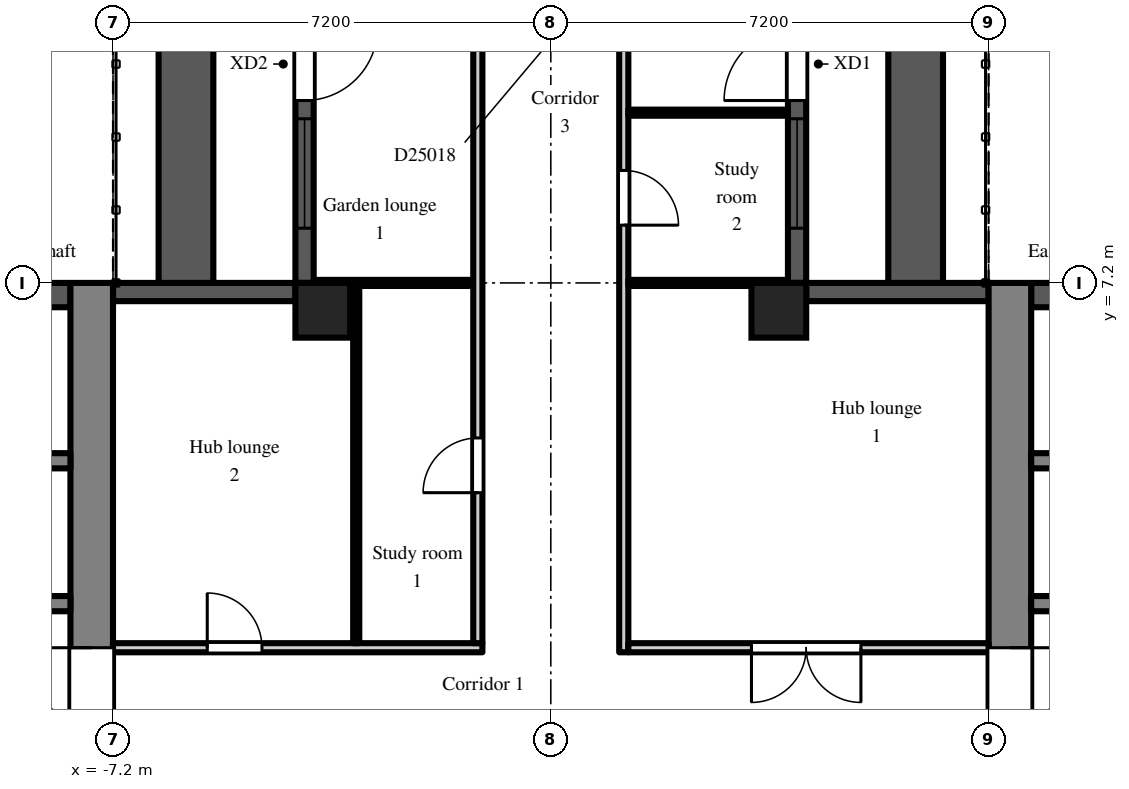
"""IFC4 building model, lengths in metres.
Left out: names, types, materials, properties, quantities, classifications, styles, units other than length and angle.
Written with IfcOpenShell. Run it as: python <this file> out.ifc"""

import sys

from ifc_helpers import new_model, si_unit, direction, frame, frame_2d, origin, origin_2d, place, context, subcontext, project, spatial, rectangle, extrude, element, fill, save


model = new_model("IFC4")
c1 = context("Model", 3, precision=1e-05, world=origin(), true_north=direction((0.0, 1.0)))
c2 = subcontext(c1, "Body", "Model", "MODEL_VIEW")
j1 = project(units=[si_unit("LENGTHUNIT", "METRE"), si_unit("PLANEANGLEUNIT", "RADIAN")], contexts=[c1])
p1 = place(None, origin())
s1 = spatial("IfcSite", under=j1, at=p1, CompositionType="ELEMENT")
p2 = place(p1, origin())
s2 = spatial("IfcBuilding", under=s1, at=p2, CompositionType="ELEMENT")
p3 = place(p2, frame((0.0, 0.0, 170.7)))
s3 = spatial("IfcBuildingStorey", under=s2, at=p3, CompositionType="ELEMENT", Elevation=170.7)
for number, where, z_axis, x_axis in (
    (1, (-3.75, 6.75, 0.0), (0.0, 0.0, 1.0), (1.0, 0.0, 0.0)),
    (2, (3.75, 6.75, 0.0), (0.0, 0.0, 1.0), (1.0, 0.0, 0.0)),
):
    element("IfcColumn", number, at=place(p3, frame(where, z_axis=z_axis, x_axis=x_axis)), inside=s3, PredefinedType="COLUMN", context=c2, shape_type="SweptSolid", body=[
        extrude(rectangle(XDim=0.9, YDim=0.9, at=origin_2d()), origin(), (0.0, 0.0, 1.0), 3.0),
    ])
p4 = place(p3, frame((7.2, 7.05, 0.0), z_axis=(0.0, 0.0, 1.0), x_axis=(-1.0, 0.0, 0.0)))
e3 = element("IfcWall", 3, at=p4, inside=s3, PredefinedType="SOLIDWALL", context=c2, shape_type="SweptSolid", body=[
    extrude(rectangle(XDim=3.0, YDim=0.3, at=frame_2d((1.5, 0.0))), origin(), (0.0, 0.0, 1.0), 2.2),
])
p5 = place(p3, frame((4.05, 7.2, 0.0), z_axis=(0.0, 0.0, 1.0), x_axis=(0.0, 1.0, 0.0)))
e4 = element("IfcWall", 4, at=p5, inside=s3, PredefinedType="SOLIDWALL", context=c2, shape_type="SweptSolid", body=[
    extrude(rectangle(XDim=7.2, YDim=0.3, at=frame_2d((3.6, 0.0))), origin(), (0.0, 0.0, 1.0), 2.2),
])
p6 = place(p5, frame((3.0, 0.0, 0.0)))
e5 = element("IfcOpeningElement", 5, at=p6, cuts=e4, PredefinedType="OPENING", context=c2, shape_type="SweptSolid", body=[
    extrude(rectangle(XDim=1.2, YDim=2.05, at=frame_2d((0.6, 1.025))), frame((0.0, 0.16, 0.0), z_axis=(0.0, -1.0, 0.0), x_axis=(1.0, 0.0, 0.0)), (0.0, 0.0, 1.0), 0.32),
])
p7 = place(p5, frame((0.9, 0.0, 0.2)))
e6 = element("IfcOpeningElement", 6, at=p7, cuts=e4, PredefinedType="OPENING", context=c2, shape_type="SweptSolid", body=[
    extrude(rectangle(XDim=1.8, YDim=1.85, at=frame_2d((0.9, 0.925))), frame((0.0, 0.16, 0.0), z_axis=(0.0, -1.0, 0.0), x_axis=(1.0, 0.0, 0.0)), (0.0, 0.0, 1.0), 0.32),
])
p8 = place(p5, frame((4.5, 0.0, 0.2)))
e7 = element("IfcOpeningElement", 7, at=p8, cuts=e4, PredefinedType="OPENING", context=c2, shape_type="SweptSolid", body=[
    extrude(rectangle(XDim=1.8, YDim=1.85, at=frame_2d((0.9, 0.925))), frame((0.0, 0.16, 0.0), z_axis=(0.0, -1.0, 0.0), x_axis=(1.0, 0.0, 0.0)), (0.0, 0.0, 1.0), 0.32),
])
p9 = place(p3, frame((-4.05, 14.4, 0.0), z_axis=(0.0, 0.0, 1.0), x_axis=(0.0, -1.0, 0.0)))
e8 = element("IfcWall", 8, at=p9, inside=s3, PredefinedType="SOLIDWALL", context=c2, shape_type="SweptSolid", body=[
    extrude(rectangle(XDim=7.2, YDim=0.3, at=frame_2d((3.6, 0.0))), origin(), (0.0, 0.0, 1.0), 2.2),
])
p10 = place(p9, frame((3.0, 0.0, 0.0)))
e9 = element("IfcOpeningElement", 9, at=p10, cuts=e8, PredefinedType="OPENING", context=c2, shape_type="SweptSolid", body=[
    extrude(rectangle(XDim=1.2, YDim=2.05, at=frame_2d((0.6, 1.025))), frame((0.0, 0.16, 0.0), z_axis=(0.0, -1.0, 0.0), x_axis=(1.0, 0.0, 0.0)), (0.0, 0.0, 1.0), 0.32),
])
p11 = place(p9, frame((0.9, 0.0, 0.2)))
e10 = element("IfcOpeningElement", 10, at=p11, cuts=e8, PredefinedType="OPENING", context=c2, shape_type="SweptSolid", body=[
    extrude(rectangle(XDim=1.8, YDim=1.85, at=frame_2d((0.9, 0.925))), frame((0.0, 0.16, 0.0), z_axis=(0.0, -1.0, 0.0), x_axis=(1.0, 0.0, 0.0)), (0.0, 0.0, 1.0), 0.32),
])
p12 = place(p9, frame((4.5, 0.0, 0.2)))
e11 = element("IfcOpeningElement", 11, at=p12, cuts=e8, PredefinedType="OPENING", context=c2, shape_type="SweptSolid", body=[
    extrude(rectangle(XDim=1.8, YDim=1.85, at=frame_2d((0.9, 0.925))), frame((0.0, 0.16, 0.0), z_axis=(0.0, -1.0, 0.0), x_axis=(1.0, 0.0, 0.0)), (0.0, 0.0, 1.0), 0.32),
])
p13 = place(p3, frame((-4.2, 7.05, 0.0), z_axis=(0.0, 0.0, 1.0), x_axis=(-1.0, 0.0, 0.0)))
e12 = element("IfcWall", 12, at=p13, inside=s3, PredefinedType="SOLIDWALL", context=c2, shape_type="SweptSolid", body=[
    extrude(rectangle(XDim=3.0, YDim=0.3, at=frame_2d((1.5, 0.0))), origin(), (0.0, 0.0, 1.0), 2.2),
])
for number, where, z_axis, x_axis in (
    (13, (6.0, 7.2, 0.0), (0.0, 0.0, 1.0), (0.0, 1.0, 0.0)),
    (14, (-6.0, 7.2, 0.0), (0.0, 0.0, 1.0), (0.0, 1.0, 0.0)),
):
    element("IfcWall", number, at=place(p3, frame(where, z_axis=z_axis, x_axis=x_axis)), inside=s3, PredefinedType="PARAPET", context=c2, shape_type="SweptSolid", body=[
        extrude(rectangle(XDim=7.2, YDim=0.9, at=frame_2d((3.6, 0.0))), origin(), (0.0, 0.0, 1.0), 0.8),
    ])
p14 = place(p3, frame((7.55, -7.2, 0.0), z_axis=(0.0, 0.0, 1.0), x_axis=(0.0, 1.0, 0.0)))
e15 = element("IfcWall", 15, at=p14, inside=s3, PredefinedType="SHEAR", context=c2, shape_type="SweptSolid", body=[
    extrude(rectangle(XDim=14.4, YDim=0.7, at=frame_2d((7.2, 0.0))), origin(), (0.0, 0.0, 1.0), 2.6),
])
p15 = place(p14, frame((6.0, 0.0, 0.0)))
e16 = element("IfcOpeningElement", 16, at=p15, cuts=e15, PredefinedType="OPENING", context=c2, shape_type="SweptSolid", body=[
    extrude(rectangle(XDim=2.4, YDim=2.2, at=frame_2d((1.2, 1.1))), frame((0.0, 0.36, 0.0), z_axis=(0.0, -1.0, 0.0), x_axis=(1.0, 0.0, 0.0)), (0.0, 0.0, 1.0), 0.72),
])
p16 = place(p3, frame((7.9, 7.0, 0.0), z_axis=(0.0, 0.0, 1.0), x_axis=(1.0, 0.0, 0.0)))
e17 = element("IfcWall", 17, at=p16, inside=s3, PredefinedType="SHEAR", context=c2, shape_type="SweptSolid", body=[
    extrude(rectangle(XDim=12.95, YDim=0.4, at=frame_2d((6.475, 0.0))), origin(), (0.0, 0.0, 1.0), 2.6),
])
p17 = place(p3, frame((7.9, 1.925, 0.0), z_axis=(0.0, 0.0, 1.0), x_axis=(1.0, 0.0, 0.0)))
e18 = element("IfcWall", 18, at=p17, inside=s3, PredefinedType="SHEAR", context=c2, shape_type="SweptSolid", body=[
    extrude(rectangle(XDim=12.95, YDim=0.25, at=frame_2d((6.475, 0.0))), origin(), (0.0, 0.0, 1.0), 2.6),
])
p18 = place(p17, frame((4.825, 0.0, 0.0)))
e19 = element("IfcOpeningElement", 19, at=p18, cuts=e18, PredefinedType="OPENING", context=c2, shape_type="SweptSolid", body=[
    extrude(rectangle(XDim=1.1, YDim=2.1, at=frame_2d((0.55, 1.05))), frame((0.0, 0.135, 0.0), z_axis=(0.0, -1.0, 0.0), x_axis=(1.0, 0.0, 0.0)), (0.0, 0.0, 1.0), 0.27),
])
p19 = place(p17, frame((7.025, 0.0, 0.0)))
e20 = element("IfcOpeningElement", 20, at=p19, cuts=e18, PredefinedType="OPENING", context=c2, shape_type="SweptSolid", body=[
    extrude(rectangle(XDim=1.1, YDim=2.1, at=frame_2d((0.55, 1.05))), frame((0.0, 0.135, 0.0), z_axis=(0.0, -1.0, 0.0), x_axis=(1.0, 0.0, 0.0)), (0.0, 0.0, 1.0), 0.27),
])
p20 = place(p17, frame((9.225, 0.0, 0.0)))
e21 = element("IfcOpeningElement", 21, at=p20, cuts=e18, PredefinedType="OPENING", context=c2, shape_type="SweptSolid", body=[
    extrude(rectangle(XDim=1.1, YDim=2.1, at=frame_2d((0.55, 1.05))), frame((0.0, 0.135, 0.0), z_axis=(0.0, -1.0, 0.0), x_axis=(1.0, 0.0, 0.0)), (0.0, 0.0, 1.0), 0.27),
])
p21 = place(p17, frame((0.525, 0.0, 0.0)))
e22 = element("IfcOpeningElement", 22, at=p21, cuts=e18, PredefinedType="OPENING", context=c2, shape_type="SweptSolid", body=[
    extrude(rectangle(XDim=0.9, YDim=2.1, at=frame_2d((0.45, 1.05))), frame((0.0, 0.135, 0.0), z_axis=(0.0, -1.0, 0.0), x_axis=(1.0, 0.0, 0.0)), (0.0, 0.0, 1.0), 0.27),
])
p22 = place(p17, frame((2.625, 0.0, 0.0)))
e23 = element("IfcOpeningElement", 23, at=p22, cuts=e18, PredefinedType="OPENING", context=c2, shape_type="SweptSolid", body=[
    extrude(rectangle(XDim=1.1, YDim=2.1, at=frame_2d((0.55, 1.05))), frame((0.0, 0.135, 0.0), z_axis=(0.0, -1.0, 0.0), x_axis=(1.0, 0.0, 0.0)), (0.0, 0.0, 1.0), 0.27),
])
p23 = place(p17, frame((11.525, 0.0, 0.0)))
e24 = element("IfcOpeningElement", 24, at=p23, cuts=e18, PredefinedType="OPENING", context=c2, shape_type="SweptSolid", body=[
    extrude(rectangle(XDim=0.9, YDim=2.1, at=frame_2d((0.45, 1.05))), frame((0.0, 0.135, 0.0), z_axis=(0.0, -1.0, 0.0), x_axis=(1.0, 0.0, 0.0)), (0.0, 0.0, 1.0), 0.27),
])
p24 = place(p3, frame((7.9, 4.275, 0.0), z_axis=(0.0, 0.0, 1.0), x_axis=(1.0, 0.0, 0.0)))
e25 = element("IfcWall", 25, at=p24, inside=s3, PredefinedType="SHEAR", context=c2, shape_type="SweptSolid", body=[
    extrude(rectangle(XDim=1.95, YDim=0.25, at=frame_2d((0.975, 0.0))), origin(), (0.0, 0.0, 1.0), 2.6),
])
p25 = place(p3, frame((-7.55, -7.2, 0.0), z_axis=(0.0, 0.0, 1.0), x_axis=(0.0, 1.0, 0.0)))
e26 = element("IfcWall", 26, at=p25, inside=s3, PredefinedType="SHEAR", context=c2, shape_type="SweptSolid", body=[
    extrude(rectangle(XDim=14.4, YDim=0.7, at=frame_2d((7.2, 0.0))), origin(), (0.0, 0.0, 1.0), 2.6),
])
p26 = place(p25, frame((6.0, 0.0, 0.0)))
e27 = element("IfcOpeningElement", 27, at=p26, cuts=e26, PredefinedType="OPENING", context=c2, shape_type="SweptSolid", body=[
    extrude(rectangle(XDim=2.4, YDim=2.2, at=frame_2d((1.2, 1.1))), frame((0.0, 0.36, 0.0), z_axis=(0.0, -1.0, 0.0), x_axis=(1.0, 0.0, 0.0)), (0.0, 0.0, 1.0), 0.72),
])
p27 = place(p3, frame((-7.9, 7.0, 0.0), z_axis=(0.0, 0.0, 1.0), x_axis=(-1.0, 0.0, 0.0)))
e28 = element("IfcWall", 28, at=p27, inside=s3, PredefinedType="SHEAR", context=c2, shape_type="SweptSolid", body=[
    extrude(rectangle(XDim=12.95, YDim=0.4, at=frame_2d((6.475, 0.0))), origin(), (0.0, 0.0, 1.0), 2.6),
])
p28 = place(p3, frame((-7.9, 1.925, 0.0), z_axis=(0.0, 0.0, 1.0), x_axis=(-1.0, 0.0, 0.0)))
e29 = element("IfcWall", 29, at=p28, inside=s3, PredefinedType="SHEAR", context=c2, shape_type="SweptSolid", body=[
    extrude(rectangle(XDim=12.95, YDim=0.25, at=frame_2d((6.475, 0.0))), origin(), (0.0, 0.0, 1.0), 2.6),
])
p29 = place(p28, frame((4.825, 0.0, 0.0)))
e30 = element("IfcOpeningElement", 30, at=p29, cuts=e29, PredefinedType="OPENING", context=c2, shape_type="SweptSolid", body=[
    extrude(rectangle(XDim=1.1, YDim=2.1, at=frame_2d((0.55, 1.05))), frame((0.0, 0.135, 0.0), z_axis=(0.0, -1.0, 0.0), x_axis=(1.0, 0.0, 0.0)), (0.0, 0.0, 1.0), 0.27),
])
p30 = place(p28, frame((7.025, 0.0, 0.0)))
e31 = element("IfcOpeningElement", 31, at=p30, cuts=e29, PredefinedType="OPENING", context=c2, shape_type="SweptSolid", body=[
    extrude(rectangle(XDim=1.1, YDim=2.1, at=frame_2d((0.55, 1.05))), frame((0.0, 0.135, 0.0), z_axis=(0.0, -1.0, 0.0), x_axis=(1.0, 0.0, 0.0)), (0.0, 0.0, 1.0), 0.27),
])
p31 = place(p28, frame((9.225, 0.0, 0.0)))
e32 = element("IfcOpeningElement", 32, at=p31, cuts=e29, PredefinedType="OPENING", context=c2, shape_type="SweptSolid", body=[
    extrude(rectangle(XDim=1.1, YDim=2.1, at=frame_2d((0.55, 1.05))), frame((0.0, 0.135, 0.0), z_axis=(0.0, -1.0, 0.0), x_axis=(1.0, 0.0, 0.0)), (0.0, 0.0, 1.0), 0.27),
])
p32 = place(p28, frame((0.525, 0.0, 0.0)))
e33 = element("IfcOpeningElement", 33, at=p32, cuts=e29, PredefinedType="OPENING", context=c2, shape_type="SweptSolid", body=[
    extrude(rectangle(XDim=0.9, YDim=2.1, at=frame_2d((0.45, 1.05))), frame((0.0, 0.135, 0.0), z_axis=(0.0, -1.0, 0.0), x_axis=(1.0, 0.0, 0.0)), (0.0, 0.0, 1.0), 0.27),
])
p33 = place(p28, frame((2.625, 0.0, 0.0)))
e34 = element("IfcOpeningElement", 34, at=p33, cuts=e29, PredefinedType="OPENING", context=c2, shape_type="SweptSolid", body=[
    extrude(rectangle(XDim=1.1, YDim=2.1, at=frame_2d((0.55, 1.05))), frame((0.0, 0.135, 0.0), z_axis=(0.0, -1.0, 0.0), x_axis=(1.0, 0.0, 0.0)), (0.0, 0.0, 1.0), 0.27),
])
p34 = place(p28, frame((11.525, 0.0, 0.0)))
e35 = element("IfcOpeningElement", 35, at=p34, cuts=e29, PredefinedType="OPENING", context=c2, shape_type="SweptSolid", body=[
    extrude(rectangle(XDim=0.9, YDim=2.1, at=frame_2d((0.45, 1.05))), frame((0.0, 0.135, 0.0), z_axis=(0.0, -1.0, 0.0), x_axis=(1.0, 0.0, 0.0)), (0.0, 0.0, 1.0), 0.27),
])
p35 = place(p3, frame((-7.9, 4.275, 0.0), z_axis=(0.0, 0.0, 1.0), x_axis=(-1.0, 0.0, 0.0)))
e36 = element("IfcWall", 36, at=p35, inside=s3, PredefinedType="SHEAR", context=c2, shape_type="SweptSolid", body=[
    extrude(rectangle(XDim=1.95, YDim=0.25, at=frame_2d((0.975, 0.0))), origin(), (0.0, 0.0, 1.0), 2.6),
])
p36 = place(p3, frame((-7.2, 1.2, 0.0), z_axis=(0.0, 0.0, 1.0), x_axis=(1.0, 0.0, 0.0)))
e37 = element("IfcWall", 37, at=p36, inside=s3, PredefinedType="PARTITIONING", context=c2, shape_type="SweptSolid", body=[
    extrude(rectangle(XDim=6.075, YDim=0.15, at=frame_2d((3.038, 0.0))), origin(), (0.0, 0.0, 1.0), 2.6),
])
p37 = place(p36, frame((1.55, 0.0, 0.0)))
e38 = element("IfcOpeningElement", 38, at=p37, cuts=e37, PredefinedType="OPENING", context=c2, shape_type="SweptSolid", body=[
    extrude(rectangle(XDim=0.9, YDim=2.1, at=frame_2d((0.45, 1.05))), frame((0.0, 0.085, 0.0), z_axis=(0.0, -1.0, 0.0), x_axis=(1.0, 0.0, 0.0)), (0.0, 0.0, 1.0), 0.17),
])
p38 = place(p3, frame((-3.9, 7.2, 0.0), z_axis=(0.0, 0.0, 1.0), x_axis=(1.0, 0.0, 0.0)))
e39 = element("IfcWall", 39, at=p38, inside=s3, PredefinedType="PARTITIONING", context=c2, shape_type="SweptSolid", body=[
    extrude(rectangle(XDim=2.625, YDim=0.1, at=frame_2d((1.312, 0.0))), origin(), (0.0, 0.0, 1.0), 2.6),
])
p39 = place(p3, frame((-3.2, 1.275, 0.0), z_axis=(0.0, 0.0, 1.0), x_axis=(0.0, 1.0, 0.0)))
e40 = element("IfcWall", 40, at=p39, inside=s3, PredefinedType="PARTITIONING", context=c2, shape_type="SweptSolid", body=[
    extrude(rectangle(XDim=5.875, YDim=0.1, at=frame_2d((2.938, 0.0))), origin(), (0.0, 0.0, 1.0), 2.6),
])
p40 = place(p3, frame((-1.2, 1.275, 0.0), z_axis=(0.0, 0.0, 1.0), x_axis=(0.0, 1.0, 0.0)))
e41 = element("IfcWall", 41, at=p40, inside=s3, PredefinedType="PARTITIONING", context=c2, shape_type="SweptSolid", body=[
    extrude(rectangle(XDim=16.65, YDim=0.15, at=frame_2d((8.325, 0.0))), origin(), (0.0, 0.0, 1.0), 2.6),
])
p41 = place(p40, frame((2.475, 0.0, 0.0)))
e42 = element("IfcOpeningElement", 42, at=p41, cuts=e41, PredefinedType="OPENING", context=c2, shape_type="SweptSolid", body=[
    extrude(rectangle(XDim=0.9, YDim=2.1, at=frame_2d((0.45, 1.05))), frame((0.0, 0.085, 0.0), z_axis=(0.0, -1.0, 0.0), x_axis=(1.0, 0.0, 0.0)), (0.0, 0.0, 1.0), 0.17),
])
p42 = place(p40, frame((10.875, 0.0, 0.0)))
e43 = element("IfcOpeningElement", 43, at=p42, cuts=e41, PredefinedType="OPENING", context=c2, shape_type="SweptSolid", body=[
    extrude(rectangle(XDim=0.9, YDim=2.1, at=frame_2d((0.45, 1.05))), frame((0.0, 0.085, 0.0), z_axis=(0.0, -1.0, 0.0), x_axis=(1.0, 0.0, 0.0)), (0.0, 0.0, 1.0), 0.17),
])
p43 = place(p40, frame((13.725, 0.0, 0.0)))
e44 = element("IfcOpeningElement", 44, at=p43, cuts=e41, PredefinedType="OPENING", context=c2, shape_type="SweptSolid", body=[
    extrude(rectangle(XDim=1.0, YDim=2.1, at=frame_2d((0.5, 1.05))), frame((0.0, 0.085, 0.0), z_axis=(0.0, -1.0, 0.0), x_axis=(1.0, 0.0, 0.0)), (0.0, 0.0, 1.0), 0.17),
])
p44 = place(p3, frame((1.2, 1.125, 0.0), z_axis=(0.0, 0.0, 1.0), x_axis=(0.0, 1.0, 0.0)))
e45 = element("IfcWall", 45, at=p44, inside=s3, PredefinedType="PARTITIONING", context=c2, shape_type="SweptSolid", body=[
    extrude(rectangle(XDim=16.8, YDim=0.15, at=frame_2d((8.4, 0.0))), origin(), (0.0, 0.0, 1.0), 2.6),
])
p45 = place(p44, frame((7.025, 0.0, 0.0)))
e46 = element("IfcOpeningElement", 46, at=p45, cuts=e45, PredefinedType="OPENING", context=c2, shape_type="SweptSolid", body=[
    extrude(rectangle(XDim=0.9, YDim=2.1, at=frame_2d((0.45, 1.05))), frame((0.0, 0.085, 0.0), z_axis=(0.0, -1.0, 0.0), x_axis=(1.0, 0.0, 0.0)), (0.0, 0.0, 1.0), 0.17),
])
p46 = place(p44, frame((10.625, 0.0, 0.0)))
e47 = element("IfcOpeningElement", 47, at=p46, cuts=e45, PredefinedType="OPENING", context=c2, shape_type="SweptSolid", body=[
    extrude(rectangle(XDim=0.9, YDim=2.1, at=frame_2d((0.45, 1.05))), frame((0.0, 0.085, 0.0), z_axis=(0.0, -1.0, 0.0), x_axis=(1.0, 0.0, 0.0)), (0.0, 0.0, 1.0), 0.17),
])
p47 = place(p44, frame((13.475, 0.0, 0.0)))
e48 = element("IfcOpeningElement", 48, at=p47, cuts=e45, PredefinedType="OPENING", context=c2, shape_type="SweptSolid", body=[
    extrude(rectangle(XDim=1.0, YDim=2.1, at=frame_2d((0.5, 1.05))), frame((0.0, 0.085, 0.0), z_axis=(0.0, -1.0, 0.0), x_axis=(1.0, 0.0, 0.0)), (0.0, 0.0, 1.0), 0.17),
])
p48 = place(p3, frame((1.275, 1.2, 0.0), z_axis=(0.0, 0.0, 1.0), x_axis=(1.0, 0.0, 0.0)))
e49 = element("IfcWall", 49, at=p48, inside=s3, PredefinedType="PARTITIONING", context=c2, shape_type="SweptSolid", body=[
    extrude(rectangle(XDim=5.925, YDim=0.15, at=frame_2d((2.962, 0.0))), origin(), (0.0, 0.0, 1.0), 2.6),
])
p49 = place(p48, frame((2.025, 0.0, 0.0)))
e50 = element("IfcOpeningElement", 50, at=p49, cuts=e49, PredefinedType="OPENING", context=c2, shape_type="SweptSolid", body=[
    extrude(rectangle(XDim=1.8, YDim=2.1, at=frame_2d((0.9, 1.05))), frame((0.0, 0.085, 0.0), z_axis=(0.0, -1.0, 0.0), x_axis=(1.0, 0.0, 0.0)), (0.0, 0.0, 1.0), 0.17),
])
for number, where, z_axis, x_axis in (
    (51, (1.275, 7.2, 0.0), (0.0, 0.0, 1.0), (1.0, 0.0, 0.0)),
    (52, (1.275, 10.0, 0.0), (0.0, 0.0, 1.0), (1.0, 0.0, 0.0)),
):
    element("IfcWall", number, at=place(p3, frame(where, z_axis=z_axis, x_axis=x_axis)), inside=s3, PredefinedType="PARTITIONING", context=c2, shape_type="SweptSolid", body=[
        extrude(rectangle(XDim=2.625, YDim=0.1, at=frame_2d((1.312, 0.0))), origin(), (0.0, 0.0, 1.0), 2.6),
    ])
p50 = place(p6, origin())
e53 = element("IfcDoor", 53, at=p50, inside=s3, OperationType="SINGLE_SWING_LEFT", PredefinedType="DOOR", context=c2, shape_type="SweptSolid", body=[
    extrude(rectangle(XDim=1.2, YDim=2.05, at=frame_2d((0.6, 1.025))), frame((0.0, 0.025, 0.0), z_axis=(0.0, -1.0, 0.0), x_axis=(1.0, 0.0, 0.0)), (0.0, 0.0, 1.0), 0.05),
])
fill(e5, e53)
p51 = place(p7, origin())
e54 = element("IfcWindow", 54, at=p51, inside=s3, PartitioningType="SINGLE_PANEL", PredefinedType="WINDOW", context=c2, shape_type="SweptSolid", body=[
    extrude(rectangle(XDim=1.8, YDim=1.85, at=frame_2d((0.9, 0.925))), frame((0.0, 0.03, 0.0), z_axis=(0.0, -1.0, 0.0), x_axis=(1.0, 0.0, 0.0)), (0.0, 0.0, 1.0), 0.06),
])
fill(e6, e54)
p52 = place(p10, origin())
e55 = element("IfcDoor", 55, at=p52, inside=s3, OperationType="SINGLE_SWING_LEFT", PredefinedType="DOOR", context=c2, shape_type="SweptSolid", body=[
    extrude(rectangle(XDim=1.2, YDim=2.05, at=frame_2d((0.6, 1.025))), frame((0.0, 0.025, 0.0), z_axis=(0.0, -1.0, 0.0), x_axis=(1.0, 0.0, 0.0)), (0.0, 0.0, 1.0), 0.05),
])
fill(e9, e55)
p53 = place(p12, origin())
e56 = element("IfcWindow", 56, at=p53, inside=s3, PartitioningType="SINGLE_PANEL", PredefinedType="WINDOW", context=c2, shape_type="SweptSolid", body=[
    extrude(rectangle(XDim=1.8, YDim=1.85, at=frame_2d((0.9, 0.925))), frame((0.0, 0.03, 0.0), z_axis=(0.0, -1.0, 0.0), x_axis=(1.0, 0.0, 0.0)), (0.0, 0.0, 1.0), 0.06),
])
fill(e11, e56)
p54 = place(p15, frame((2.4, 0.0, 0.0), z_axis=(0.0, 0.0, 1.0), x_axis=(-1.0, 0.0, 0.0)))
e57 = element("IfcDoor", 57, at=p54, inside=s3, OperationType="DOUBLE_DOOR_DOUBLE_SWING", PredefinedType="DOOR", context=c2, shape_type="SweptSolid", body=[
    extrude(rectangle(XDim=2.4, YDim=2.2, at=frame_2d((1.2, 1.1))), frame((0.0, 0.025, 0.0), z_axis=(0.0, -1.0, 0.0), x_axis=(1.0, 0.0, 0.0)), (0.0, 0.0, 1.0), 0.05),
])
fill(e16, e57)
p55 = place(p26, origin())
e58 = element("IfcDoor", 58, at=p55, inside=s3, OperationType="DOUBLE_DOOR_DOUBLE_SWING", PredefinedType="DOOR", context=c2, shape_type="SweptSolid", body=[
    extrude(rectangle(XDim=2.4, YDim=2.2, at=frame_2d((1.2, 1.1))), frame((0.0, 0.025, 0.0), z_axis=(0.0, -1.0, 0.0), x_axis=(1.0, 0.0, 0.0)), (0.0, 0.0, 1.0), 0.05),
])
fill(e27, e58)
p56 = place(p49, frame((1.8, 0.0, 0.0), z_axis=(0.0, 0.0, 1.0), x_axis=(-1.0, 0.0, 0.0)))
e59 = element("IfcDoor", 59, at=p56, inside=s3, OperationType="DOUBLE_DOOR_DOUBLE_SWING", PredefinedType="DOOR", context=c2, shape_type="SweptSolid", body=[
    extrude(rectangle(XDim=1.8, YDim=2.1, at=frame_2d((0.9, 1.05))), frame((0.0, 0.025, 0.0), z_axis=(0.0, -1.0, 0.0), x_axis=(1.0, 0.0, 0.0)), (0.0, 0.0, 1.0), 0.05),
])
fill(e50, e59)
p57 = place(p41, origin())
e60 = element("IfcDoor", 60, at=p57, inside=s3, OperationType="SINGLE_SWING_LEFT", PredefinedType="DOOR", context=c2, shape_type="SweptSolid", body=[
    extrude(rectangle(XDim=0.9, YDim=2.1, at=frame_2d((0.45, 1.05))), frame((0.0, 0.025, 0.0), z_axis=(0.0, -1.0, 0.0), x_axis=(1.0, 0.0, 0.0)), (0.0, 0.0, 1.0), 0.05),
])
fill(e42, e60)
p58 = place(p37, origin())
e61 = element("IfcDoor", 61, at=p58, inside=s3, OperationType="SINGLE_SWING_LEFT", PredefinedType="DOOR", context=c2, shape_type="SweptSolid", body=[
    extrude(rectangle(XDim=0.9, YDim=2.1, at=frame_2d((0.45, 1.05))), frame((0.0, 0.025, 0.0), z_axis=(0.0, -1.0, 0.0), x_axis=(1.0, 0.0, 0.0)), (0.0, 0.0, 1.0), 0.05),
])
fill(e38, e61)
p59 = place(p45, frame((0.9, 0.0, 0.0), z_axis=(0.0, 0.0, 1.0), x_axis=(-1.0, 0.0, 0.0)))
e62 = element("IfcDoor", 62, at=p59, inside=s3, OperationType="SINGLE_SWING_RIGHT", PredefinedType="DOOR", context=c2, shape_type="SweptSolid", body=[
    extrude(rectangle(XDim=0.9, YDim=2.1, at=frame_2d((0.45, 1.05))), frame((0.0, 0.025, 0.0), z_axis=(0.0, -1.0, 0.0), x_axis=(1.0, 0.0, 0.0)), (0.0, 0.0, 1.0), 0.05),
])
fill(e46, e62)
save(model, sys.argv[1])
